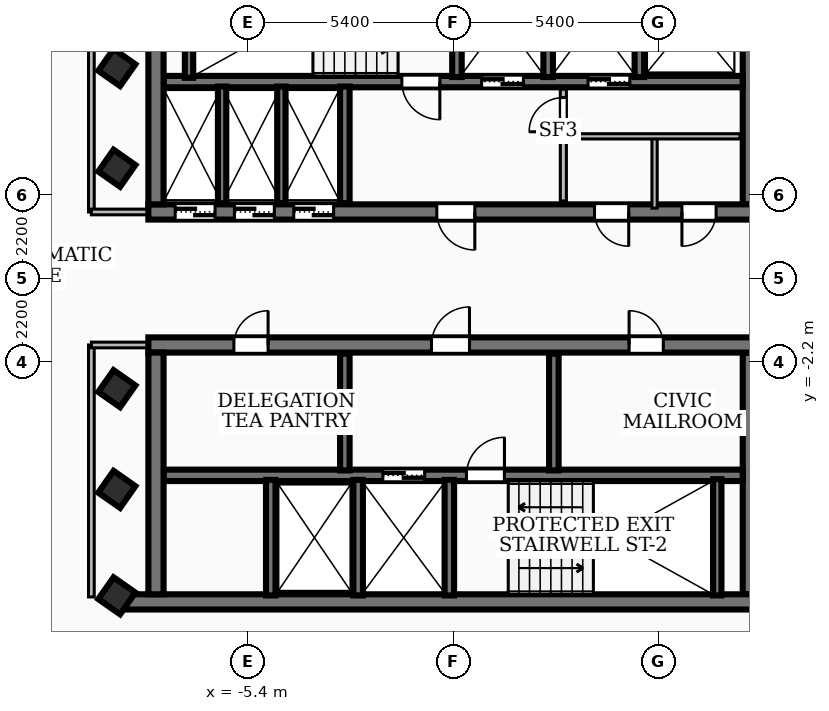
"""IFC4 building model, lengths in metres.
Left out: names, types, materials, properties, quantities, classifications, styles, units other than length and angle.
Written with IfcOpenShell. Run it as: python <this file> out.ifc"""

import sys

from ifc_helpers import new_model, si_unit, direction, frame, frame_2d, origin, origin_2d, place, context, subcontext, project, spatial, rectangle, extrude, element, fill, save


model = new_model("IFC4")
c1 = context("Model", 3, precision=1e-05, world=origin(), true_north=direction((0.0, 1.0)))
c2 = subcontext(c1, "Body", "Model", "MODEL_VIEW")
j1 = project(units=[si_unit("LENGTHUNIT", "METRE"), si_unit("PLANEANGLEUNIT", "RADIAN")], contexts=[c1])
p1 = place(None, origin())
s1 = spatial("IfcSite", under=j1, at=p1, CompositionType="ELEMENT")
p2 = place(p1, origin())
s2 = spatial("IfcBuilding", under=s1, at=p2, CompositionType="ELEMENT")
p3 = place(p2, frame((0.0, 0.0, 268.02)))
s3 = spatial("IfcBuildingStorey", under=s2, at=p3, CompositionType="ELEMENT", Elevation=268.02)
p4 = place(p3, frame((8.02, 1.75, 0.0), z_axis=(0.0, 0.0, 1.0), x_axis=(-1.0, 0.0, 0.0)))
e1 = element("IfcWall", 1, at=p4, inside=s3, PredefinedType="SHEAR", context=c2, shape_type="SweptSolid", body=[
    extrude(rectangle(XDim=16.04, YDim=0.4, at=frame_2d((8.02, 0.0))), origin(), (0.0, 0.0, 1.0), 3.16),
])
p5 = place(p4, frame((7.45, 0.0, 0.0)))
e2 = element("IfcOpeningElement", 2, at=p5, cuts=e1, PredefinedType="OPENING", context=c2, shape_type="SweptSolid", body=[
    extrude(rectangle(XDim=1.0, YDim=2.1, at=frame_2d((0.5, 1.05))), frame((0.0, 0.21, 0.0), z_axis=(0.0, -1.0, 0.0), x_axis=(1.0, 0.0, 0.0)), (0.0, 0.0, 1.0), 0.42),
])
p6 = place(p4, frame((14.285, 0.0, 0.0)))
e3 = element("IfcOpeningElement", 3, at=p6, cuts=e1, PredefinedType="OPENING", context=c2, shape_type="SweptSolid", body=[
    extrude(rectangle(XDim=1.05, YDim=2.15, at=frame_2d((0.525, 1.075))), frame((0.0, 0.21, 0.0), z_axis=(0.0, -1.0, 0.0), x_axis=(1.0, 0.0, 0.0)), (0.0, 0.0, 1.0), 0.42),
])
p7 = place(p4, frame((12.725, 0.0, 0.0)))
e4 = element("IfcOpeningElement", 4, at=p7, cuts=e1, PredefinedType="OPENING", context=c2, shape_type="SweptSolid", body=[
    extrude(rectangle(XDim=1.05, YDim=2.15, at=frame_2d((0.525, 1.075))), frame((0.0, 0.21, 0.0), z_axis=(0.0, -1.0, 0.0), x_axis=(1.0, 0.0, 0.0)), (0.0, 0.0, 1.0), 0.42),
])
p8 = place(p4, frame((11.165, 0.0, 0.0)))
e5 = element("IfcOpeningElement", 5, at=p8, cuts=e1, PredefinedType="OPENING", context=c2, shape_type="SweptSolid", body=[
    extrude(rectangle(XDim=1.05, YDim=2.15, at=frame_2d((0.525, 1.075))), frame((0.0, 0.21, 0.0), z_axis=(0.0, -1.0, 0.0), x_axis=(1.0, 0.0, 0.0)), (0.0, 0.0, 1.0), 0.42),
])
p9 = place(p4, frame((3.4, 0.0, 0.0)))
e6 = element("IfcOpeningElement", 6, at=p9, cuts=e1, PredefinedType="OPENING", context=c2, shape_type="SweptSolid", body=[
    extrude(rectangle(XDim=0.9, YDim=2.06, at=frame_2d((0.45, 1.03))), frame((0.0, 0.21, 0.0), z_axis=(0.0, -1.0, 0.0), x_axis=(1.0, 0.0, 0.0)), (0.0, 0.0, 1.0), 0.42),
])
p10 = place(p4, frame((1.1, 0.0, 0.0)))
e7 = element("IfcOpeningElement", 7, at=p10, cuts=e1, PredefinedType="OPENING", context=c2, shape_type="SweptSolid", body=[
    extrude(rectangle(XDim=0.9, YDim=2.06, at=frame_2d((0.45, 1.03))), frame((0.0, 0.21, 0.0), z_axis=(0.0, -1.0, 0.0), x_axis=(1.0, 0.0, 0.0)), (0.0, 0.0, 1.0), 0.42),
])
for number, where, z_axis, x_axis in (
    (8, (-7.82, 1.95, 0.0), (0.0, 0.0, 1.0), (0.0, 1.0, 0.0)),
    (9, (7.82, 8.31, 0.0), (0.0, 0.0, 1.0), (0.0, -1.0, 0.0)),
):
    element("IfcWall", number, at=place(p3, frame(where, z_axis=z_axis, x_axis=x_axis)), inside=s3, PredefinedType="SHEAR", context=c2, shape_type="SweptSolid", body=[
        extrude(rectangle(XDim=6.36, YDim=0.4, at=frame_2d((3.18, 0.0))), origin(), (0.0, 0.0, 1.0), 3.16),
    ])
p11 = place(p3, frame((7.62, 5.18, 0.0), z_axis=(0.0, 0.0, 1.0), x_axis=(-1.0, 0.0, 0.0)))
e10 = element("IfcWall", 10, at=p11, inside=s3, PredefinedType="SOLIDWALL", context=c2, shape_type="SweptSolid", body=[
    extrude(rectangle(XDim=15.24, YDim=0.3, at=frame_2d((7.62, 0.0))), origin(), (0.0, 0.0, 1.0), 3.16),
])
p12 = place(p11, frame((5.77, 0.0, 0.0)))
e11 = element("IfcOpeningElement", 11, at=p12, cuts=e10, PredefinedType="OPENING", context=c2, shape_type="SweptSolid", body=[
    extrude(rectangle(XDim=1.1, YDim=2.15, at=frame_2d((0.55, 1.075))), frame((0.0, 0.16, 0.0), z_axis=(0.0, -1.0, 0.0), x_axis=(1.0, 0.0, 0.0)), (0.0, 0.0, 1.0), 0.32),
])
p13 = place(p11, frame((2.97, 0.0, 0.0)))
e12 = element("IfcOpeningElement", 12, at=p13, cuts=e10, PredefinedType="OPENING", context=c2, shape_type="SweptSolid", body=[
    extrude(rectangle(XDim=1.1, YDim=2.15, at=frame_2d((0.55, 1.075))), frame((0.0, 0.16, 0.0), z_axis=(0.0, -1.0, 0.0), x_axis=(1.0, 0.0, 0.0)), (0.0, 0.0, 1.0), 0.32),
])
p14 = place(p11, frame((7.97, 0.0, 0.0)))
e13 = element("IfcOpeningElement", 13, at=p14, cuts=e10, PredefinedType="OPENING", context=c2, shape_type="SweptSolid", body=[
    extrude(rectangle(XDim=1.0, YDim=2.1, at=frame_2d((0.5, 1.05))), frame((0.0, 0.16, 0.0), z_axis=(0.0, -1.0, 0.0), x_axis=(1.0, 0.0, 0.0)), (0.0, 0.0, 1.0), 0.32),
])
p15 = place(p3, frame((8.78, -8.51, 0.0), z_axis=(0.0, 0.0, 1.0), x_axis=(-1.0, 0.0, 0.0)))
e14 = element("IfcWall", 14, at=p15, inside=s3, PredefinedType="SHEAR", context=c2, shape_type="SweptSolid", body=[
    extrude(rectangle(XDim=17.56, YDim=0.4, at=frame_2d((8.78, 0.0))), origin(), (0.0, 0.0, 1.0), 3.16),
])
p16 = place(p3, frame((-8.02, -1.75, 0.0), z_axis=(0.0, 0.0, 1.0), x_axis=(1.0, 0.0, 0.0)))
e15 = element("IfcWall", 15, at=p16, inside=s3, PredefinedType="SHEAR", context=c2, shape_type="SweptSolid", body=[
    extrude(rectangle(XDim=16.04, YDim=0.4, at=frame_2d((8.02, 0.0))), origin(), (0.0, 0.0, 1.0), 3.16),
])
p17 = place(p16, frame((7.45, 0.0, 0.0)))
e16 = element("IfcOpeningElement", 16, at=p17, cuts=e15, PredefinedType="OPENING", context=c2, shape_type="SweptSolid", body=[
    extrude(rectangle(XDim=1.0, YDim=2.1, at=frame_2d((0.5, 1.05))), frame((0.0, 0.21, 0.0), z_axis=(0.0, -1.0, 0.0), x_axis=(1.0, 0.0, 0.0)), (0.0, 0.0, 1.0), 0.42),
])
p18 = place(p16, frame((12.65, 0.0, 0.0)))
e17 = element("IfcOpeningElement", 17, at=p18, cuts=e15, PredefinedType="OPENING", context=c2, shape_type="SweptSolid", body=[
    extrude(rectangle(XDim=0.9, YDim=2.06, at=frame_2d((0.45, 1.03))), frame((0.0, 0.21, 0.0), z_axis=(0.0, -1.0, 0.0), x_axis=(1.0, 0.0, 0.0)), (0.0, 0.0, 1.0), 0.42),
])
p19 = place(p16, frame((2.25, 0.0, 0.0)))
e18 = element("IfcOpeningElement", 18, at=p19, cuts=e15, PredefinedType="OPENING", context=c2, shape_type="SweptSolid", body=[
    extrude(rectangle(XDim=0.9, YDim=2.06, at=frame_2d((0.45, 1.03))), frame((0.0, 0.21, 0.0), z_axis=(0.0, -1.0, 0.0), x_axis=(1.0, 0.0, 0.0)), (0.0, 0.0, 1.0), 0.42),
])
for number, where, z_axis, x_axis in (
    (19, (-7.82, -8.31, 0.0), (0.0, 0.0, 1.0), (0.0, 1.0, 0.0)),
    (20, (7.82, -1.95, 0.0), (0.0, 0.0, 1.0), (0.0, -1.0, 0.0)),
):
    element("IfcWall", number, at=place(p3, frame(where, z_axis=z_axis, x_axis=x_axis)), inside=s3, PredefinedType="SHEAR", context=c2, shape_type="SweptSolid", body=[
        extrude(rectangle(XDim=6.36, YDim=0.4, at=frame_2d((3.18, 0.0))), origin(), (0.0, 0.0, 1.0), 3.16),
    ])
p20 = place(p3, frame((-7.62, -5.18, 0.0), z_axis=(0.0, 0.0, 1.0), x_axis=(1.0, 0.0, 0.0)))
e21 = element("IfcWall", 21, at=p20, inside=s3, PredefinedType="SOLIDWALL", context=c2, shape_type="SweptSolid", body=[
    extrude(rectangle(XDim=15.24, YDim=0.3, at=frame_2d((7.62, 0.0))), origin(), (0.0, 0.0, 1.0), 3.16),
])
p21 = place(p20, frame((5.77, 0.0, 0.0)))
e22 = element("IfcOpeningElement", 22, at=p21, cuts=e21, PredefinedType="OPENING", context=c2, shape_type="SweptSolid", body=[
    extrude(rectangle(XDim=1.1, YDim=2.15, at=frame_2d((0.55, 1.075))), frame((0.0, 0.16, 0.0), z_axis=(0.0, -1.0, 0.0), x_axis=(1.0, 0.0, 0.0)), (0.0, 0.0, 1.0), 0.32),
])
p22 = place(p20, frame((7.97, 0.0, 0.0)))
e23 = element("IfcOpeningElement", 23, at=p22, cuts=e21, PredefinedType="OPENING", context=c2, shape_type="SweptSolid", body=[
    extrude(rectangle(XDim=1.0, YDim=2.1, at=frame_2d((0.5, 1.05))), frame((0.0, 0.16, 0.0), z_axis=(0.0, -1.0, 0.0), x_axis=(1.0, 0.0, 0.0)), (0.0, 0.0, 1.0), 0.32),
])
for number, where, z_axis, x_axis in (
    (24, (-6.95, 5.28, 0.0), (0.0, 0.0, 1.0), (0.0, 1.0, 0.0)),
    (25, (6.95, -8.34, 0.0), (0.0, 0.0, 1.0), (0.0, 1.0, 0.0)),
):
    element("IfcWall", number, at=place(p3, frame(where, z_axis=z_axis, x_axis=x_axis)), inside=s3, PredefinedType="SOLIDWALL", context=c2, shape_type="SweptSolid", body=[
        extrude(rectangle(XDim=3.06, YDim=0.22, at=frame_2d((1.53, 0.0))), origin(), (0.0, 0.0, 1.0), 3.16),
    ])
for number, where, z_axis, x_axis in (
    (26, (0.1, 5.3, 0.0), (0.0, 0.0, 1.0), (0.0, 1.0, 0.0)),
    (27, (2.5, 5.3, 0.0), (0.0, 0.0, 1.0), (0.0, 1.0, 0.0)),
    (28, (4.9, 5.3, 0.0), (0.0, 0.0, 1.0), (0.0, 1.0, 0.0)),
):
    element("IfcWall", number, at=place(p3, frame(where, z_axis=z_axis, x_axis=x_axis)), inside=s3, PredefinedType="SOLIDWALL", context=c2, shape_type="SweptSolid", body=[
        extrude(rectangle(XDim=3.04, YDim=0.25, at=frame_2d((1.52, 0.0))), origin(), (0.0, 0.0, 1.0), 3.16),
    ])
p23 = place(p3, frame((-2.85, 1.98, 0.0), z_axis=(0.0, 0.0, 1.0), x_axis=(0.0, 1.0, 0.0)))
e29 = element("IfcWall", 29, at=p23, inside=s3, PredefinedType="SOLIDWALL", context=c2, shape_type="SweptSolid", body=[
    extrude(rectangle(XDim=3.07, YDim=0.25, at=frame_2d((1.535, 0.0))), origin(), (0.0, 0.0, 1.0), 3.16),
])
for number, where, z_axis, x_axis in (
    (30, (-0.1, -8.34, 0.0), (0.0, 0.0, 1.0), (0.0, 1.0, 0.0)),
    (31, (-2.5, -8.34, 0.0), (0.0, 0.0, 1.0), (0.0, 1.0, 0.0)),
    (32, (-4.8, -8.34, 0.0), (0.0, 0.0, 1.0), (0.0, 1.0, 0.0)),
):
    element("IfcWall", number, at=place(p3, frame(where, z_axis=z_axis, x_axis=x_axis)), inside=s3, PredefinedType="SOLIDWALL", context=c2, shape_type="SweptSolid", body=[
        extrude(rectangle(XDim=3.04, YDim=0.25, at=frame_2d((1.52, 0.0))), origin(), (0.0, 0.0, 1.0), 3.16),
    ])
for number, where, z_axis, x_axis in (
    (33, (-2.85, -5.05, 0.0), (0.0, 0.0, 1.0), (0.0, 1.0, 0.0)),
    (34, (2.65, -5.05, 0.0), (0.0, 0.0, 1.0), (0.0, 1.0, 0.0)),
):
    element("IfcWall", number, at=place(p3, frame(where, z_axis=z_axis, x_axis=x_axis)), inside=s3, PredefinedType="SOLIDWALL", context=c2, shape_type="SweptSolid", body=[
        extrude(rectangle(XDim=3.07, YDim=0.25, at=frame_2d((1.535, 0.0))), origin(), (0.0, 0.0, 1.0), 3.16),
    ])
for number, where, z_axis, x_axis in (
    (35, (-6.08, 1.98, 0.0), (0.0, 0.0, 1.0), (0.0, 1.0, 0.0)),
    (36, (-4.52, 1.98, 0.0), (0.0, 0.0, 1.0), (0.0, 1.0, 0.0)),
):
    element("IfcWall", number, at=place(p3, frame(where, z_axis=z_axis, x_axis=x_axis)), inside=s3, PredefinedType="SOLIDWALL", context=c2, shape_type="SweptSolid", body=[
        extrude(rectangle(XDim=3.07, YDim=0.22, at=frame_2d((1.535, 0.0))), origin(), (0.0, 0.0, 1.0), 3.16),
    ])
for number, where, z_axis, x_axis in (
    (37, (-8.85, -5.55, 0.0), (0.0, 0.0, 1.0), (0.574, 0.819, 0.0)),
    (38, (-8.85, -2.9, 0.0), (0.0, 0.0, 1.0), (0.574, 0.819, 0.0)),
    (39, (-8.85, 2.9, 0.0), (0.0, 0.0, 1.0), (0.574, 0.819, 0.0)),
    (40, (-8.85, 5.55, 0.0), (0.0, 0.0, 1.0), (0.574, 0.819, 0.0)),
    (41, (-8.85, -8.35, 0.0), (0.0, 0.0, 1.0), (0.574, 0.819, 0.0)),
):
    element("IfcColumn", number, at=place(p3, frame(where, z_axis=z_axis, x_axis=x_axis)), inside=s3, PredefinedType="COLUMN", context=c2, shape_type="SweptSolid", body=[
        extrude(rectangle(XDim=0.7, YDim=0.7, at=origin_2d()), origin(), (0.0, 0.0, 1.0), 3.42),
    ])
p24 = place(p3, frame((2.316, -19.273, 0.0), z_axis=(0.0, 0.0, 1.0), x_axis=(-0.81873650559, 0.574169430059, 0.0)))
e42 = element("IfcWall", 42, at=p24, inside=s3, PredefinedType="SOLIDWALL", context=c2, shape_type="SweptSolid", body=[
    extrude(rectangle(XDim=25.923, YDim=0.2, at=frame_2d((12.961, 0.0))), origin(), (0.0, 0.0, 1.0), 3.16),
])
p25 = place(p24, frame((19.32, 0.0, 0.85)))
e43 = element("IfcOpeningElement", 43, at=p25, cuts=e42, PredefinedType="OPENING", context=c2, shape_type="SweptSolid", body=[
    extrude(rectangle(XDim=1.8, YDim=1.8, at=frame_2d((0.9, 0.9))), frame((0.0, 0.11, 0.0), z_axis=(0.0, -1.0, 0.0), x_axis=(1.0, 0.0, 0.0)), (0.0, 0.0, 1.0), 0.22),
])
p26 = place(p3, frame((2.9, 2.04, 0.0), z_axis=(0.0, 0.0, 1.0), x_axis=(0.0, 1.0, 0.0)))
e44 = element("IfcWall", 44, at=p26, inside=s3, PredefinedType="PARTITIONING", context=c2, shape_type="SweptSolid", body=[
    extrude(rectangle(XDim=2.94, YDim=0.16, at=frame_2d((1.47, 0.0))), origin(), (0.0, 0.0, 1.0), 2.39),
])
p27 = place(p26, frame((1.82, 0.0, 0.0)))
e45 = element("IfcOpeningElement", 45, at=p27, cuts=e44, PredefinedType="OPENING", context=c2, shape_type="SweptSolid", body=[
    extrude(rectangle(XDim=0.9, YDim=2.06, at=frame_2d((0.45, 1.03))), frame((0.0, 0.09, 0.0), z_axis=(0.0, -1.0, 0.0), x_axis=(1.0, 0.0, 0.0)), (0.0, 0.0, 1.0), 0.18),
])
p28 = place(p3, frame((2.9, 3.74, 0.0), z_axis=(0.0, 0.0, 1.0), x_axis=(1.0, 0.0, 0.0)))
e46 = element("IfcWall", 46, at=p28, inside=s3, PredefinedType="PARTITIONING", context=c2, shape_type="SweptSolid", body=[
    extrude(rectangle(XDim=4.65, YDim=0.138, at=frame_2d((2.325, 0.0))), origin(), (0.0, 0.0, 1.0), 3.16),
])
p29 = place(p3, frame((5.3, 1.85, 0.0), z_axis=(0.0, 0.0, 1.0), x_axis=(0.0, 1.0, 0.0)))
e47 = element("IfcWall", 47, at=p29, inside=s3, PredefinedType="PARTITIONING", context=c2, shape_type="SweptSolid", body=[
    extrude(rectangle(XDim=1.89, YDim=0.138, at=frame_2d((0.945, 0.0))), origin(), (0.0, 0.0, 1.0), 2.39),
])
p30 = place(p3, frame((-9.52, 1.75, 0.0), z_axis=(0.0, 0.0, 1.0), x_axis=(0.0, 1.0, 0.0)))
e48 = element("IfcWall", 48, at=p30, inside=s3, PredefinedType="PARTITIONING", context=c2, shape_type="SweptSolid", body=[
    extrude(rectangle(XDim=6.63, YDim=0.15, at=frame_2d((3.315, 0.0))), origin(), (0.0, 0.0, 1.0), 2.53),
])
p31 = place(p3, frame((-7.85, 1.75, 0.0), z_axis=(0.0, 0.0, 1.0), x_axis=(-1.0, 0.0, 0.0)))
e49 = element("IfcWall", 49, at=p31, inside=s3, PredefinedType="PARTITIONING", context=c2, shape_type="SweptSolid", body=[
    extrude(rectangle(XDim=1.67, YDim=0.15, at=frame_2d((0.835, 0.0))), origin(), (0.0, 0.0, 1.0), 2.39),
])
p32 = place(p3, frame((-9.52, -8.38, 0.0), z_axis=(0.0, 0.0, 1.0), x_axis=(0.0, 1.0, 0.0)))
e50 = element("IfcWall", 50, at=p32, inside=s3, PredefinedType="PARTITIONING", context=c2, shape_type="SweptSolid", body=[
    extrude(rectangle(XDim=6.63, YDim=0.15, at=frame_2d((3.315, 0.0))), origin(), (0.0, 0.0, 1.0), 3.16),
])
p33 = place(p3, frame((-7.85, -1.75, 0.0), z_axis=(0.0, 0.0, 1.0), x_axis=(-1.0, 0.0, 0.0)))
e51 = element("IfcWall", 51, at=p33, inside=s3, PredefinedType="PARTITIONING", context=c2, shape_type="SweptSolid", body=[
    extrude(rectangle(XDim=1.67, YDim=0.15, at=frame_2d((0.835, 0.0))), origin(), (0.0, 0.0, 1.0), 2.39),
])
p34 = place(p3, frame((-17.625, -0.245, 0.0), z_axis=(0.0, 0.0, 1.0), x_axis=(0.574126736534, 0.818766444352, 0.0)))
e52 = element("IfcWall", 52, at=p34, inside=s3, PredefinedType="PARTITIONING", context=c2, shape_type="SweptSolid", body=[
    extrude(rectangle(XDim=20.34, YDim=0.145, at=frame_2d((10.17, 0.0))), origin(), (0.0, 0.0, 1.0), 2.53),
])
p35 = place(p34, frame((11.16, 0.0, 0.0)))
e53 = element("IfcOpeningElement", 53, at=p35, cuts=e52, PredefinedType="OPENING", context=c2, shape_type="SweptSolid", body=[
    extrude(rectangle(XDim=0.86, YDim=2.04, at=frame_2d((0.43, 1.02))), frame((0.0, 0.083, 0.0), z_axis=(0.0, -1.0, 0.0), x_axis=(1.0, 0.0, 0.0)), (0.0, 0.0, 1.0), 0.165),
])
p36 = place(p34, frame((9.72, 0.0, 0.0)))
e54 = element("IfcOpeningElement", 54, at=p36, cuts=e52, PredefinedType="OPENING", context=c2, shape_type="SweptSolid", body=[
    extrude(rectangle(XDim=0.86, YDim=2.04, at=frame_2d((0.43, 1.02))), frame((0.0, 0.083, 0.0), z_axis=(0.0, -1.0, 0.0), x_axis=(1.0, 0.0, 0.0)), (0.0, 0.0, 1.0), 0.165),
])
p37 = place(p3, frame((17.625, 0.245, 0.0), z_axis=(0.0, 0.0, 1.0), x_axis=(-0.574126736534, -0.818766444352, 0.0)))
e55 = element("IfcWall", 55, at=p37, inside=s3, PredefinedType="PARTITIONING", context=c2, shape_type="SweptSolid", body=[
    extrude(rectangle(XDim=20.34, YDim=0.145, at=frame_2d((10.17, 0.0))), origin(), (0.0, 0.0, 1.0), 2.53),
])
p38 = place(p37, frame((11.16, 0.0, 0.0)))
e56 = element("IfcOpeningElement", 56, at=p38, cuts=e55, PredefinedType="OPENING", context=c2, shape_type="SweptSolid", body=[
    extrude(rectangle(XDim=0.86, YDim=2.04, at=frame_2d((0.43, 1.02))), frame((0.0, 0.083, 0.0), z_axis=(0.0, -1.0, 0.0), x_axis=(1.0, 0.0, 0.0)), (0.0, 0.0, 1.0), 0.165),
])
p39 = place(p37, frame((9.72, 0.0, 0.0)))
e57 = element("IfcOpeningElement", 57, at=p39, cuts=e55, PredefinedType="OPENING", context=c2, shape_type="SweptSolid", body=[
    extrude(rectangle(XDim=0.86, YDim=2.04, at=frame_2d((0.43, 1.02))), frame((0.0, 0.083, 0.0), z_axis=(0.0, -1.0, 0.0), x_axis=(1.0, 0.0, 0.0)), (0.0, 0.0, 1.0), 0.165),
])
p40 = place(p5, origin())
e58 = element("IfcDoor", 58, at=p40, inside=s3, OperationType="SINGLE_SWING_LEFT", PredefinedType="DOOR", context=c2, shape_type="SweptSolid", body=[
    extrude(rectangle(XDim=1.0, YDim=2.1, at=frame_2d((0.5, 1.05))), frame((0.0, 0.025, 0.0), z_axis=(0.0, -1.0, 0.0), x_axis=(1.0, 0.0, 0.0)), (0.0, 0.0, 1.0), 0.05),
])
fill(e2, e58)
p41 = place(p17, origin())
e59 = element("IfcDoor", 59, at=p41, inside=s3, OperationType="SINGLE_SWING_RIGHT", PredefinedType="DOOR", context=c2, shape_type="SweptSolid", body=[
    extrude(rectangle(XDim=1.0, YDim=2.1, at=frame_2d((0.5, 1.05))), frame((0.0, 0.025, 0.0), z_axis=(0.0, -1.0, 0.0), x_axis=(1.0, 0.0, 0.0)), (0.0, 0.0, 1.0), 0.05),
])
fill(e16, e59)
p42 = place(p12, origin())
e60 = element("IfcDoor", 60, at=p42, inside=s3, OperationType="DOUBLE_DOOR_SLIDING", PredefinedType="DOOR", context=c2, shape_type="SweptSolid", body=[
    extrude(rectangle(XDim=1.1, YDim=2.15, at=frame_2d((0.55, 1.075))), frame((0.0, 0.025, 0.0), z_axis=(0.0, -1.0, 0.0), x_axis=(1.0, 0.0, 0.0)), (0.0, 0.0, 1.0), 0.05),
])
fill(e11, e60)
p43 = place(p13, origin())
e61 = element("IfcDoor", 61, at=p43, inside=s3, OperationType="DOUBLE_DOOR_SLIDING", PredefinedType="DOOR", context=c2, shape_type="SweptSolid", body=[
    extrude(rectangle(XDim=1.1, YDim=2.15, at=frame_2d((0.55, 1.075))), frame((0.0, 0.025, 0.0), z_axis=(0.0, -1.0, 0.0), x_axis=(1.0, 0.0, 0.0)), (0.0, 0.0, 1.0), 0.05),
])
fill(e12, e61)
p44 = place(p14, origin())
e62 = element("IfcDoor", 62, at=p44, inside=s3, OperationType="SINGLE_SWING_LEFT", PredefinedType="DOOR", context=c2, shape_type="SweptSolid", body=[
    extrude(rectangle(XDim=1.0, YDim=2.1, at=frame_2d((0.5, 1.05))), frame((0.0, 0.025, 0.0), z_axis=(0.0, -1.0, 0.0), x_axis=(1.0, 0.0, 0.0)), (0.0, 0.0, 1.0), 0.05),
])
fill(e13, e62)
p45 = place(p21, origin())
e63 = element("IfcDoor", 63, at=p45, inside=s3, OperationType="DOUBLE_DOOR_SLIDING", PredefinedType="DOOR", context=c2, shape_type="SweptSolid", body=[
    extrude(rectangle(XDim=1.1, YDim=2.15, at=frame_2d((0.55, 1.075))), frame((0.0, 0.025, 0.0), z_axis=(0.0, -1.0, 0.0), x_axis=(1.0, 0.0, 0.0)), (0.0, 0.0, 1.0), 0.05),
])
fill(e22, e63)
p46 = place(p22, origin())
e64 = element("IfcDoor", 64, at=p46, inside=s3, OperationType="SINGLE_SWING_RIGHT", PredefinedType="DOOR", context=c2, shape_type="SweptSolid", body=[
    extrude(rectangle(XDim=1.0, YDim=2.1, at=frame_2d((0.5, 1.05))), frame((0.0, 0.025, 0.0), z_axis=(0.0, -1.0, 0.0), x_axis=(1.0, 0.0, 0.0)), (0.0, 0.0, 1.0), 0.05),
])
fill(e23, e64)
p47 = place(p6, origin())
e65 = element("IfcDoor", 65, at=p47, inside=s3, OperationType="DOUBLE_DOOR_SLIDING", PredefinedType="DOOR", context=c2, shape_type="SweptSolid", body=[
    extrude(rectangle(XDim=1.05, YDim=2.15, at=frame_2d((0.525, 1.075))), frame((0.0, 0.025, 0.0), z_axis=(0.0, -1.0, 0.0), x_axis=(1.0, 0.0, 0.0)), (0.0, 0.0, 1.0), 0.05),
])
fill(e3, e65)
p48 = place(p7, origin())
e66 = element("IfcDoor", 66, at=p48, inside=s3, OperationType="DOUBLE_DOOR_SLIDING", PredefinedType="DOOR", context=c2, shape_type="SweptSolid", body=[
    extrude(rectangle(XDim=1.05, YDim=2.15, at=frame_2d((0.525, 1.075))), frame((0.0, 0.025, 0.0), z_axis=(0.0, -1.0, 0.0), x_axis=(1.0, 0.0, 0.0)), (0.0, 0.0, 1.0), 0.05),
])
fill(e4, e66)
p49 = place(p8, origin())
e67 = element("IfcDoor", 67, at=p49, inside=s3, OperationType="DOUBLE_DOOR_SLIDING", PredefinedType="DOOR", context=c2, shape_type="SweptSolid", body=[
    extrude(rectangle(XDim=1.05, YDim=2.15, at=frame_2d((0.525, 1.075))), frame((0.0, 0.025, 0.0), z_axis=(0.0, -1.0, 0.0), x_axis=(1.0, 0.0, 0.0)), (0.0, 0.0, 1.0), 0.05),
])
fill(e5, e67)
p50 = place(p18, origin())
e68 = element("IfcDoor", 68, at=p50, inside=s3, OperationType="SINGLE_SWING_LEFT", PredefinedType="DOOR", context=c2, shape_type="SweptSolid", body=[
    extrude(rectangle(XDim=0.9, YDim=2.06, at=frame_2d((0.45, 1.03))), frame((0.0, 0.025, 0.0), z_axis=(0.0, -1.0, 0.0), x_axis=(1.0, 0.0, 0.0)), (0.0, 0.0, 1.0), 0.05),
])
fill(e17, e68)
p51 = place(p19, origin())
e69 = element("IfcDoor", 69, at=p51, inside=s3, OperationType="SINGLE_SWING_RIGHT", PredefinedType="DOOR", context=c2, shape_type="SweptSolid", body=[
    extrude(rectangle(XDim=0.9, YDim=2.06, at=frame_2d((0.45, 1.03))), frame((0.0, 0.025, 0.0), z_axis=(0.0, -1.0, 0.0), x_axis=(1.0, 0.0, 0.0)), (0.0, 0.0, 1.0), 0.05),
])
fill(e18, e69)
p52 = place(p9, origin())
e70 = element("IfcDoor", 70, at=p52, inside=s3, OperationType="SINGLE_SWING_LEFT", PredefinedType="DOOR", context=c2, shape_type="SweptSolid", body=[
    extrude(rectangle(XDim=0.9, YDim=2.06, at=frame_2d((0.45, 1.03))), frame((0.0, 0.025, 0.0), z_axis=(0.0, -1.0, 0.0), x_axis=(1.0, 0.0, 0.0)), (0.0, 0.0, 1.0), 0.05),
])
fill(e6, e70)
p53 = place(p10, origin())
e71 = element("IfcDoor", 71, at=p53, inside=s3, OperationType="SINGLE_SWING_RIGHT", PredefinedType="DOOR", context=c2, shape_type="SweptSolid", body=[
    extrude(rectangle(XDim=0.9, YDim=2.06, at=frame_2d((0.45, 1.03))), frame((0.0, 0.025, 0.0), z_axis=(0.0, -1.0, 0.0), x_axis=(1.0, 0.0, 0.0)), (0.0, 0.0, 1.0), 0.05),
])
fill(e7, e71)
p54 = place(p27, origin())
e72 = element("IfcDoor", 72, at=p54, inside=s3, OperationType="SINGLE_SWING_LEFT", PredefinedType="DOOR", context=c2, shape_type="SweptSolid", body=[
    extrude(rectangle(XDim=0.9, YDim=2.06, at=frame_2d((0.45, 1.03))), frame((0.0, 0.025, 0.0), z_axis=(0.0, -1.0, 0.0), x_axis=(1.0, 0.0, 0.0)), (0.0, 0.0, 1.0), 0.05),
])
fill(e45, e72)
save(model, sys.argv[1])
